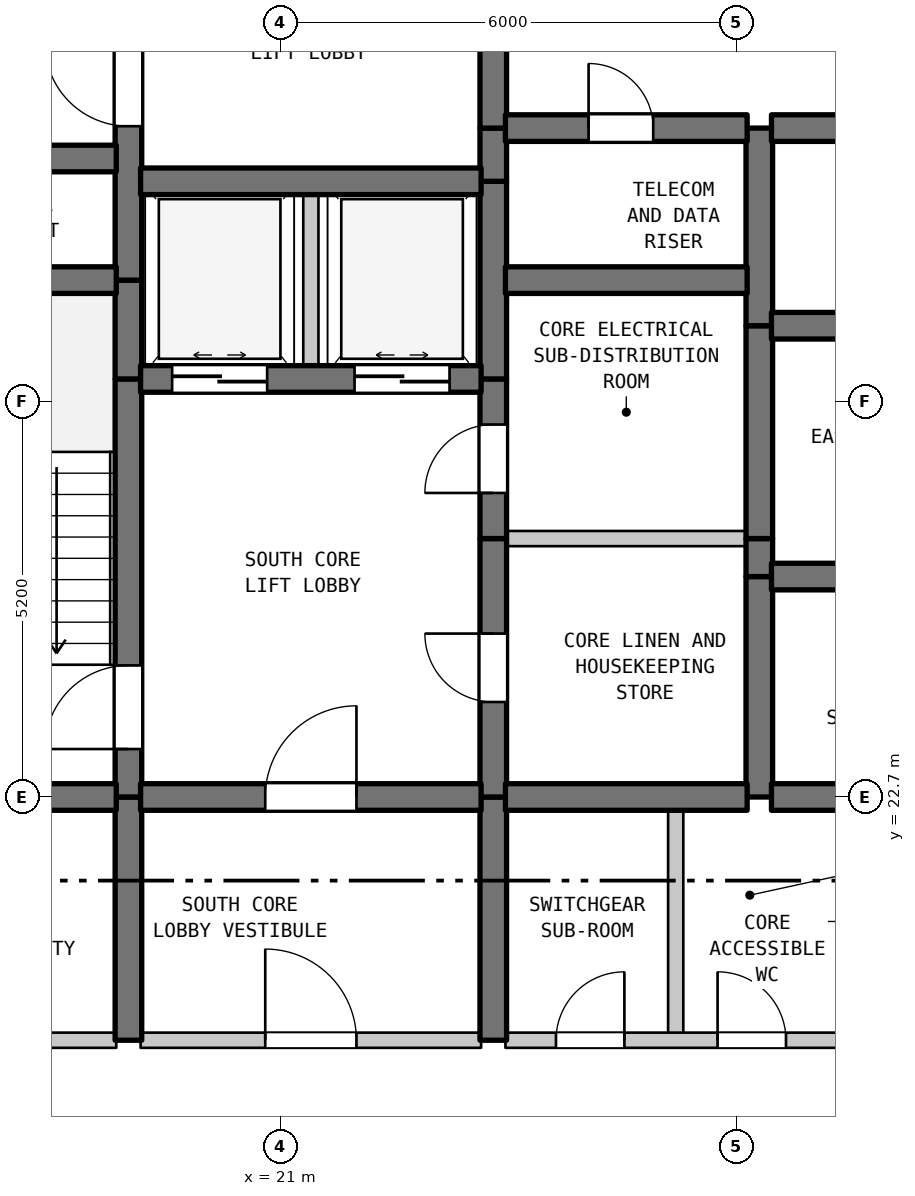
"""IFC4 building model, lengths in metres.
Left out: names, types, materials, properties, quantities, classifications, styles, units other than length and angle.
Written with IfcOpenShell. Run it as: python <this file> out.ifc"""

import sys

from ifc_helpers import new_model, si_unit, direction, frame, frame_2d, origin, place, context, subcontext, project, spatial, rectangle, extrude, element, fill, save


model = new_model("IFC4")
c1 = context("Model", 3, precision=1e-05, world=origin(), true_north=direction((0.0, 1.0)))
c2 = subcontext(c1, "Body", "Model", "MODEL_VIEW")
j1 = project(units=[si_unit("LENGTHUNIT", "METRE"), si_unit("PLANEANGLEUNIT", "RADIAN")], contexts=[c1])
p1 = place(None, origin())
s1 = spatial("IfcSite", under=j1, at=p1, CompositionType="ELEMENT")
p2 = place(p1, origin())
s2 = spatial("IfcBuilding", under=s1, at=p2, CompositionType="ELEMENT")
p3 = place(p2, frame((0.0, 0.0, 307.3)))
s3 = spatial("IfcBuildingStorey", under=s2, at=p3, CompositionType="ELEMENT", Elevation=307.3)
p4 = place(p3, frame((19.0, 19.5, 0.0), z_axis=(0.0, 0.0, 1.0), x_axis=(0.0, 1.0, 0.0)))
e1 = element("IfcWall", 1, at=p4, inside=s3, PredefinedType="SHEAR", context=c2, shape_type="SweptSolid", body=[
    extrude(rectangle(XDim=3.2, YDim=0.35, at=frame_2d((1.6, 0.0))), origin(), (0.0, 0.0, 1.0), 3.39),
])
p5 = place(p3, frame((19.0, 22.7, 0.0), z_axis=(0.0, 0.0, 1.0), x_axis=(0.0, 1.0, 0.0)))
e2 = element("IfcWall", 2, at=p5, inside=s3, PredefinedType="SHEAR", context=c2, shape_type="SweptSolid", body=[
    extrude(rectangle(XDim=5.5, YDim=0.35, at=frame_2d((2.75, 0.0))), origin(), (0.0, 0.0, 1.0), 3.39),
])
p6 = place(p5, frame((0.631, 0.0, 0.0)))
e3 = element("IfcOpeningElement", 3, at=p6, cuts=e2, PredefinedType="OPENING", context=c2, shape_type="SweptSolid", body=[
    extrude(rectangle(XDim=1.1, YDim=2.15, at=frame_2d((0.55, 1.075))), frame((0.0, 0.185, 0.0), z_axis=(0.0, -1.0, 0.0), x_axis=(1.0, 0.0, 0.0)), (0.0, 0.0, 1.0), 0.37),
])
p7 = place(p3, frame((19.0, 28.2, 0.0), z_axis=(0.0, 0.0, 1.0), x_axis=(0.0, 1.0, 0.0)))
e4 = element("IfcWall", 4, at=p7, inside=s3, PredefinedType="SHEAR", context=c2, shape_type="SweptSolid", body=[
    extrude(rectangle(XDim=1.3, YDim=0.35, at=frame_2d((0.65, 0.0))), origin(), (0.0, 0.0, 1.0), 3.39),
])
p8 = place(p3, frame((19.0, 29.5, 0.0), z_axis=(0.0, 0.0, 1.0), x_axis=(0.0, 1.0, 0.0)))
e5 = element("IfcWall", 5, at=p8, inside=s3, PredefinedType="SHEAR", context=c2, shape_type="SweptSolid", body=[
    extrude(rectangle(XDim=5.5, YDim=0.35, at=frame_2d((2.75, 0.0))), origin(), (0.0, 0.0, 1.0), 3.39),
])
p9 = place(p8, frame((2.025, 0.0, 0.0)))
e6 = element("IfcOpeningElement", 6, at=p9, cuts=e5, PredefinedType="OPENING", context=c2, shape_type="SweptSolid", body=[
    extrude(rectangle(XDim=1.1, YDim=2.15, at=frame_2d((0.55, 1.075))), frame((0.0, 0.185, 0.0), z_axis=(0.0, -1.0, 0.0), x_axis=(1.0, 0.0, 0.0)), (0.0, 0.0, 1.0), 0.37),
])
p10 = place(p3, frame((21.4, 28.2, 0.0), z_axis=(0.0, 0.0, 1.0), x_axis=(0.0, 1.0, 0.0)))
e7 = element("IfcWall", 7, at=p10, inside=s3, PredefinedType="STANDARD", context=c2, shape_type="SweptSolid", body=[
    extrude(rectangle(XDim=2.6, YDim=0.2, at=frame_2d((1.3, 0.0))), origin(), (0.0, 0.0, 1.0), 3.39),
])
p11 = place(p3, frame((23.8, 19.5, 0.0), z_axis=(0.0, 0.0, 1.0), x_axis=(0.0, 1.0, 0.0)))
e8 = element("IfcWall", 8, at=p11, inside=s3, PredefinedType="SHEAR", context=c2, shape_type="SweptSolid", body=[
    extrude(rectangle(XDim=3.2, YDim=0.35, at=frame_2d((1.6, 0.0))), origin(), (0.0, 0.0, 1.0), 3.39),
])
p12 = place(p3, frame((23.8, 22.7, 0.0), z_axis=(0.0, 0.0, 1.0), x_axis=(0.0, 1.0, 0.0)))
e9 = element("IfcWall", 9, at=p12, inside=s3, PredefinedType="SHEAR", context=c2, shape_type="SweptSolid", body=[
    extrude(rectangle(XDim=3.4, YDim=0.35, at=frame_2d((1.7, 0.0))), origin(), (0.0, 0.0, 1.0), 3.39),
])
p13 = place(p12, frame((1.25, 0.0, 0.0)))
e10 = element("IfcOpeningElement", 10, at=p13, cuts=e9, PredefinedType="OPENING", context=c2, shape_type="SweptSolid", body=[
    extrude(rectangle(XDim=0.9, YDim=2.15, at=frame_2d((0.45, 1.075))), frame((0.0, 0.185, 0.0), z_axis=(0.0, -1.0, 0.0), x_axis=(1.0, 0.0, 0.0)), (0.0, 0.0, 1.0), 0.37),
])
p14 = place(p3, frame((23.8, 26.1, 0.0), z_axis=(0.0, 0.0, 1.0), x_axis=(0.0, 1.0, 0.0)))
e11 = element("IfcWall", 11, at=p14, inside=s3, PredefinedType="SHEAR", context=c2, shape_type="SweptSolid", body=[
    extrude(rectangle(XDim=2.1, YDim=0.35, at=frame_2d((1.05, 0.0))), origin(), (0.0, 0.0, 1.0), 3.39),
])
p15 = place(p14, frame((0.6, 0.0, 0.0)))
e12 = element("IfcOpeningElement", 12, at=p15, cuts=e11, PredefinedType="OPENING", context=c2, shape_type="SweptSolid", body=[
    extrude(rectangle(XDim=0.9, YDim=2.15, at=frame_2d((0.45, 1.075))), frame((0.0, 0.185, 0.0), z_axis=(0.0, -1.0, 0.0), x_axis=(1.0, 0.0, 0.0)), (0.0, 0.0, 1.0), 0.37),
])
p16 = place(p3, frame((23.8, 28.2, 0.0), z_axis=(0.0, 0.0, 1.0), x_axis=(0.0, 1.0, 0.0)))
e13 = element("IfcWall", 13, at=p16, inside=s3, PredefinedType="SHEAR", context=c2, shape_type="SweptSolid", body=[
    extrude(rectangle(XDim=2.6, YDim=0.35, at=frame_2d((1.3, 0.0))), origin(), (0.0, 0.0, 1.0), 3.39),
])
p17 = place(p3, frame((23.8, 30.8, 0.0), z_axis=(0.0, 0.0, 1.0), x_axis=(0.0, 1.0, 0.0)))
e14 = element("IfcWall", 14, at=p17, inside=s3, PredefinedType="SHEAR", context=c2, shape_type="SweptSolid", body=[
    extrude(rectangle(XDim=0.7, YDim=0.35, at=frame_2d((0.35, 0.0))), origin(), (0.0, 0.0, 1.0), 3.39),
])
p18 = place(p3, frame((23.8, 31.5, 0.0), z_axis=(0.0, 0.0, 1.0), x_axis=(0.0, 1.0, 0.0)))
e15 = element("IfcWall", 15, at=p18, inside=s3, PredefinedType="SHEAR", context=c2, shape_type="SweptSolid", body=[
    extrude(rectangle(XDim=3.5, YDim=0.35, at=frame_2d((1.75, 0.0))), origin(), (0.0, 0.0, 1.0), 3.39),
])
p19 = place(p18, frame((1.127, 0.0, 0.0)))
e16 = element("IfcOpeningElement", 16, at=p19, cuts=e15, PredefinedType="OPENING", context=c2, shape_type="SweptSolid", body=[
    extrude(rectangle(XDim=1.1, YDim=2.15, at=frame_2d((0.55, 1.075))), frame((0.0, 0.185, 0.0), z_axis=(0.0, -1.0, 0.0), x_axis=(1.0, 0.0, 0.0)), (0.0, 0.0, 1.0), 0.37),
])
p20 = place(p3, frame((26.2, 19.5, 0.0), z_axis=(0.0, 0.0, 1.0), x_axis=(0.0, 1.0, 0.0)))
e17 = element("IfcWall", 17, at=p20, inside=s3, PredefinedType="STANDARD", context=c2, shape_type="SweptSolid", body=[
    extrude(rectangle(XDim=3.2, YDim=0.2, at=frame_2d((1.6, 0.0))), origin(), (0.0, 0.0, 1.0), 3.39),
])
p21 = place(p3, frame((27.3, 22.7, 0.0), z_axis=(0.0, 0.0, 1.0), x_axis=(0.0, 1.0, 0.0)))
e18 = element("IfcWall", 18, at=p21, inside=s3, PredefinedType="SHEAR", context=c2, shape_type="SweptSolid", body=[
    extrude(rectangle(XDim=2.9, YDim=0.35, at=frame_2d((1.45, 0.0))), origin(), (0.0, 0.0, 1.0), 3.39),
])
p22 = place(p3, frame((27.3, 25.6, 0.0), z_axis=(0.0, 0.0, 1.0), x_axis=(0.0, 1.0, 0.0)))
e19 = element("IfcWall", 19, at=p22, inside=s3, PredefinedType="SHEAR", context=c2, shape_type="SweptSolid", body=[
    extrude(rectangle(XDim=0.5, YDim=0.35, at=frame_2d((0.25, 0.0))), origin(), (0.0, 0.0, 1.0), 3.39),
])
p23 = place(p3, frame((27.3, 26.1, 0.0), z_axis=(0.0, 0.0, 1.0), x_axis=(0.0, 1.0, 0.0)))
e20 = element("IfcWall", 20, at=p23, inside=s3, PredefinedType="SHEAR", context=c2, shape_type="SweptSolid", body=[
    extrude(rectangle(XDim=2.8, YDim=0.35, at=frame_2d((1.4, 0.0))), origin(), (0.0, 0.0, 1.0), 3.39),
])
p24 = place(p3, frame((27.3, 28.9, 0.0), z_axis=(0.0, 0.0, 1.0), x_axis=(0.0, 1.0, 0.0)))
e21 = element("IfcWall", 21, at=p24, inside=s3, PredefinedType="SHEAR", context=c2, shape_type="SweptSolid", body=[
    extrude(rectangle(XDim=2.6, YDim=0.35, at=frame_2d((1.3, 0.0))), origin(), (0.0, 0.0, 1.0), 3.39),
])
p25 = place(p3, frame((15.16, 19.5, 0.0), z_axis=(0.0, 0.0, 1.0), x_axis=(1.0, 0.0, 0.0)))
e22 = element("IfcWall", 22, at=p25, inside=s3, PredefinedType="STANDARD", context=c2, shape_type="SweptSolid", body=[
    extrude(rectangle(XDim=3.68, YDim=0.2, at=frame_2d((1.84, 0.0))), origin(), (0.0, 0.0, 1.0), 3.39),
])
p26 = place(p25, frame((1.39, 0.0, 0.0)))
e23 = element("IfcOpeningElement", 23, at=p26, cuts=e22, PredefinedType="OPENING", context=c2, shape_type="SweptSolid", body=[
    extrude(rectangle(XDim=0.9, YDim=2.15, at=frame_2d((0.45, 1.075))), frame((0.0, 0.11, 0.0), z_axis=(0.0, -1.0, 0.0), x_axis=(1.0, 0.0, 0.0)), (0.0, 0.0, 1.0), 0.22),
])
p27 = place(p3, frame((19.16, 19.5, 0.0), z_axis=(0.0, 0.0, 1.0), x_axis=(1.0, 0.0, 0.0)))
e24 = element("IfcWall", 24, at=p27, inside=s3, PredefinedType="STANDARD", context=c2, shape_type="SweptSolid", body=[
    extrude(rectangle(XDim=4.48, YDim=0.2, at=frame_2d((2.24, 0.0))), origin(), (0.0, 0.0, 1.0), 3.39),
])
p28 = place(p27, frame((1.64, 0.0, 0.0)))
e25 = element("IfcOpeningElement", 25, at=p28, cuts=e24, PredefinedType="OPENING", context=c2, shape_type="SweptSolid", body=[
    extrude(rectangle(XDim=1.2, YDim=2.2, at=frame_2d((0.6, 1.1))), frame((0.0, 0.11, 0.0), z_axis=(0.0, -1.0, 0.0), x_axis=(1.0, 0.0, 0.0)), (0.0, 0.0, 1.0), 0.22),
])
p29 = place(p3, frame((23.96, 19.5, 0.0), z_axis=(0.0, 0.0, 1.0), x_axis=(1.0, 0.0, 0.0)))
e26 = element("IfcWall", 26, at=p29, inside=s3, PredefinedType="STANDARD", context=c2, shape_type="SweptSolid", body=[
    extrude(rectangle(XDim=4.455, YDim=0.2, at=frame_2d((2.228, 0.0))), origin(), (0.0, 0.0, 1.0), 3.39),
])
p30 = place(p29, frame((0.665, 0.0, 0.0)))
e27 = element("IfcOpeningElement", 27, at=p30, cuts=e26, PredefinedType="OPENING", context=c2, shape_type="SweptSolid", body=[
    extrude(rectangle(XDim=0.9, YDim=2.15, at=frame_2d((0.45, 1.075))), frame((0.0, 0.11, 0.0), z_axis=(0.0, -1.0, 0.0), x_axis=(1.0, 0.0, 0.0)), (0.0, 0.0, 1.0), 0.22),
])
p31 = place(p29, frame((2.791, 0.0, 0.0)))
e28 = element("IfcOpeningElement", 28, at=p31, cuts=e26, PredefinedType="OPENING", context=c2, shape_type="SweptSolid", body=[
    extrude(rectangle(XDim=0.9, YDim=2.15, at=frame_2d((0.45, 1.075))), frame((0.0, 0.11, 0.0), z_axis=(0.0, -1.0, 0.0), x_axis=(1.0, 0.0, 0.0)), (0.0, 0.0, 1.0), 0.22),
])
p32 = place(p3, frame((15.16, 22.7, 0.0), z_axis=(0.0, 0.0, 1.0), x_axis=(1.0, 0.0, 0.0)))
e29 = element("IfcWall", 29, at=p32, inside=s3, PredefinedType="SHEAR", context=c2, shape_type="SweptSolid", body=[
    extrude(rectangle(XDim=3.68, YDim=0.35, at=frame_2d((1.84, 0.0))), origin(), (0.0, 0.0, 1.0), 3.39),
])
p33 = place(p3, frame((19.16, 22.7, 0.0), z_axis=(0.0, 0.0, 1.0), x_axis=(1.0, 0.0, 0.0)))
e30 = element("IfcWall", 30, at=p33, inside=s3, PredefinedType="SHEAR", context=c2, shape_type="SweptSolid", body=[
    extrude(rectangle(XDim=4.48, YDim=0.35, at=frame_2d((2.24, 0.0))), origin(), (0.0, 0.0, 1.0), 3.39),
])
p34 = place(p33, frame((1.64, 0.0, 0.0)))
e31 = element("IfcOpeningElement", 31, at=p34, cuts=e30, PredefinedType="OPENING", context=c2, shape_type="SweptSolid", body=[
    extrude(rectangle(XDim=1.2, YDim=2.2, at=frame_2d((0.6, 1.1))), frame((0.0, 0.185, 0.0), z_axis=(0.0, -1.0, 0.0), x_axis=(1.0, 0.0, 0.0)), (0.0, 0.0, 1.0), 0.37),
])
p35 = place(p3, frame((23.96, 22.7, 0.0), z_axis=(0.0, 0.0, 1.0), x_axis=(1.0, 0.0, 0.0)))
e32 = element("IfcWall", 32, at=p35, inside=s3, PredefinedType="SHEAR", context=c2, shape_type="SweptSolid", body=[
    extrude(rectangle(XDim=3.18, YDim=0.35, at=frame_2d((1.59, 0.0))), origin(), (0.0, 0.0, 1.0), 3.39),
])
p36 = place(p3, frame((27.46, 22.7, 0.0), z_axis=(0.0, 0.0, 1.0), x_axis=(1.0, 0.0, 0.0)))
e33 = element("IfcWall", 33, at=p36, inside=s3, PredefinedType="SHEAR", context=c2, shape_type="SweptSolid", body=[
    extrude(rectangle(XDim=0.955, YDim=0.35, at=frame_2d((0.478, 0.0))), origin(), (0.0, 0.0, 1.0), 3.39),
])
p37 = place(p3, frame((27.46, 25.6, 0.0), z_axis=(0.0, 0.0, 1.0), x_axis=(1.0, 0.0, 0.0)))
e34 = element("IfcWall", 34, at=p37, inside=s3, PredefinedType="SHEAR", context=c2, shape_type="SweptSolid", body=[
    extrude(rectangle(XDim=3.18, YDim=0.35, at=frame_2d((1.59, 0.0))), origin(), (0.0, 0.0, 1.0), 3.39),
])
p38 = place(p37, frame((1.115, 0.0, 0.0)))
e35 = element("IfcOpeningElement", 35, at=p38, cuts=e34, PredefinedType="OPENING", context=c2, shape_type="SweptSolid", body=[
    extrude(rectangle(XDim=0.95, YDim=2.15, at=frame_2d((0.475, 1.075))), frame((0.0, 0.185, 0.0), z_axis=(0.0, -1.0, 0.0), x_axis=(1.0, 0.0, 0.0)), (0.0, 0.0, 1.0), 0.37),
])
p39 = place(p3, frame((23.96, 26.1, 0.0), z_axis=(0.0, 0.0, 1.0), x_axis=(1.0, 0.0, 0.0)))
e36 = element("IfcWall", 36, at=p39, inside=s3, PredefinedType="STANDARD", context=c2, shape_type="SweptSolid", body=[
    extrude(rectangle(XDim=3.18, YDim=0.2, at=frame_2d((1.59, 0.0))), origin(), (0.0, 0.0, 1.0), 3.39),
])
p40 = place(p3, frame((19.16, 28.2, 0.0), z_axis=(0.0, 0.0, 1.0), x_axis=(1.0, 0.0, 0.0)))
e37 = element("IfcWall", 37, at=p40, inside=s3, PredefinedType="SHEAR", context=c2, shape_type="SweptSolid", body=[
    extrude(rectangle(XDim=4.48, YDim=0.35, at=frame_2d((2.24, 0.0))), origin(), (0.0, 0.0, 1.0), 3.39),
])
p41 = place(p40, frame((0.415, 0.0, 0.0)))
e38 = element("IfcOpeningElement", 38, at=p41, cuts=e37, PredefinedType="OPENING", context=c2, shape_type="SweptSolid", body=[
    extrude(rectangle(XDim=1.25, YDim=2.2, at=frame_2d((0.625, 1.1))), frame((0.0, 0.185, 0.0), z_axis=(0.0, -1.0, 0.0), x_axis=(1.0, 0.0, 0.0)), (0.0, 0.0, 1.0), 0.37),
])
p42 = place(p40, frame((2.815, 0.0, 0.0)))
e39 = element("IfcOpeningElement", 39, at=p42, cuts=e37, PredefinedType="OPENING", context=c2, shape_type="SweptSolid", body=[
    extrude(rectangle(XDim=1.25, YDim=2.2, at=frame_2d((0.625, 1.1))), frame((0.0, 0.185, 0.0), z_axis=(0.0, -1.0, 0.0), x_axis=(1.0, 0.0, 0.0)), (0.0, 0.0, 1.0), 0.37),
])
p43 = place(p3, frame((27.46, 28.9, 0.0), z_axis=(0.0, 0.0, 1.0), x_axis=(1.0, 0.0, 0.0)))
e40 = element("IfcWall", 40, at=p43, inside=s3, PredefinedType="SHEAR", context=c2, shape_type="SweptSolid", body=[
    extrude(rectangle(XDim=3.18, YDim=0.35, at=frame_2d((1.59, 0.0))), origin(), (0.0, 0.0, 1.0), 3.39),
])
p44 = place(p43, frame((1.115, 0.0, 0.0)))
e41 = element("IfcOpeningElement", 41, at=p44, cuts=e40, PredefinedType="OPENING", context=c2, shape_type="SweptSolid", body=[
    extrude(rectangle(XDim=0.95, YDim=2.15, at=frame_2d((0.475, 1.075))), frame((0.0, 0.185, 0.0), z_axis=(0.0, -1.0, 0.0), x_axis=(1.0, 0.0, 0.0)), (0.0, 0.0, 1.0), 0.37),
])
p45 = place(p3, frame((15.16, 29.5, 0.0), z_axis=(0.0, 0.0, 1.0), x_axis=(1.0, 0.0, 0.0)))
e42 = element("IfcWall", 42, at=p45, inside=s3, PredefinedType="SHEAR", context=c2, shape_type="SweptSolid", body=[
    extrude(rectangle(XDim=3.68, YDim=0.35, at=frame_2d((1.84, 0.0))), origin(), (0.0, 0.0, 1.0), 3.39),
])
p46 = place(p3, frame((23.96, 29.5, 0.0), z_axis=(0.0, 0.0, 1.0), x_axis=(1.0, 0.0, 0.0)))
e43 = element("IfcWall", 43, at=p46, inside=s3, PredefinedType="SHEAR", context=c2, shape_type="SweptSolid", body=[
    extrude(rectangle(XDim=3.18, YDim=0.35, at=frame_2d((1.59, 0.0))), origin(), (0.0, 0.0, 1.0), 3.39),
])
p47 = place(p3, frame((19.16, 30.8, 0.0), z_axis=(0.0, 0.0, 1.0), x_axis=(1.0, 0.0, 0.0)))
e44 = element("IfcWall", 44, at=p47, inside=s3, PredefinedType="SHEAR", context=c2, shape_type="SweptSolid", body=[
    extrude(rectangle(XDim=4.48, YDim=0.35, at=frame_2d((2.24, 0.0))), origin(), (0.0, 0.0, 1.0), 3.39),
])
p48 = place(p3, frame((15.16, 31.1, 0.0), z_axis=(0.0, 0.0, 1.0), x_axis=(1.0, 0.0, 0.0)))
e45 = element("IfcWall", 45, at=p48, inside=s3, PredefinedType="SHEAR", context=c2, shape_type="SweptSolid", body=[
    extrude(rectangle(XDim=3.68, YDim=0.35, at=frame_2d((1.84, 0.0))), origin(), (0.0, 0.0, 1.0), 3.39),
])
p49 = place(p3, frame((23.96, 31.5, 0.0), z_axis=(0.0, 0.0, 1.0), x_axis=(1.0, 0.0, 0.0)))
e46 = element("IfcWall", 46, at=p49, inside=s3, PredefinedType="SHEAR", context=c2, shape_type="SweptSolid", body=[
    extrude(rectangle(XDim=3.18, YDim=0.35, at=frame_2d((1.59, 0.0))), origin(), (0.0, 0.0, 1.0), 3.39),
])
p50 = place(p49, frame((1.094, 0.0, 0.0)))
e47 = element("IfcOpeningElement", 47, at=p50, cuts=e46, PredefinedType="OPENING", context=c2, shape_type="SweptSolid", body=[
    extrude(rectangle(XDim=0.85, YDim=2.1, at=frame_2d((0.425, 1.05))), frame((0.0, 0.185, 0.0), z_axis=(0.0, -1.0, 0.0), x_axis=(1.0, 0.0, 0.0)), (0.0, 0.0, 1.0), 0.37),
])
p51 = place(p3, frame((27.46, 31.5, 0.0), z_axis=(0.0, 0.0, 1.0), x_axis=(1.0, 0.0, 0.0)))
e48 = element("IfcWall", 48, at=p51, inside=s3, PredefinedType="SHEAR", context=c2, shape_type="SweptSolid", body=[
    extrude(rectangle(XDim=3.18, YDim=0.35, at=frame_2d((1.59, 0.0))), origin(), (0.0, 0.0, 1.0), 3.39),
])
p52 = place(p6, origin())
e49 = element("IfcDoor", 49, at=p52, inside=s3, OperationType="SINGLE_SWING_LEFT", PredefinedType="DOOR", context=c2, shape_type="SweptSolid", body=[
    extrude(rectangle(XDim=1.1, YDim=2.15, at=frame_2d((0.55, 1.075))), frame((0.0, 0.025, 0.0), z_axis=(0.0, -1.0, 0.0), x_axis=(1.0, 0.0, 0.0)), (0.0, 0.0, 1.0), 0.05),
])
fill(e3, e49)
p53 = place(p9, origin())
e50 = element("IfcDoor", 50, at=p53, inside=s3, OperationType="SINGLE_SWING_RIGHT", PredefinedType="DOOR", context=c2, shape_type="SweptSolid", body=[
    extrude(rectangle(XDim=1.1, YDim=2.15, at=frame_2d((0.55, 1.075))), frame((0.0, 0.025, 0.0), z_axis=(0.0, -1.0, 0.0), x_axis=(1.0, 0.0, 0.0)), (0.0, 0.0, 1.0), 0.05),
])
fill(e6, e50)
p54 = place(p13, origin())
e51 = element("IfcDoor", 51, at=p54, inside=s3, OperationType="SINGLE_SWING_RIGHT", PredefinedType="DOOR", context=c2, shape_type="SweptSolid", body=[
    extrude(rectangle(XDim=0.9, YDim=2.15, at=frame_2d((0.45, 1.075))), frame((0.0, 0.025, 0.0), z_axis=(0.0, -1.0, 0.0), x_axis=(1.0, 0.0, 0.0)), (0.0, 0.0, 1.0), 0.05),
])
fill(e10, e51)
p55 = place(p15, origin())
e52 = element("IfcDoor", 52, at=p55, inside=s3, OperationType="SINGLE_SWING_LEFT", PredefinedType="DOOR", context=c2, shape_type="SweptSolid", body=[
    extrude(rectangle(XDim=0.9, YDim=2.15, at=frame_2d((0.45, 1.075))), frame((0.0, 0.025, 0.0), z_axis=(0.0, -1.0, 0.0), x_axis=(1.0, 0.0, 0.0)), (0.0, 0.0, 1.0), 0.05),
])
fill(e12, e52)
p56 = place(p28, origin())
e53 = element("IfcDoor", 53, at=p56, inside=s3, OperationType="SINGLE_SWING_LEFT", PredefinedType="DOOR", context=c2, shape_type="SweptSolid", body=[
    extrude(rectangle(XDim=1.2, YDim=2.2, at=frame_2d((0.6, 1.1))), frame((0.0, 0.025, 0.0), z_axis=(0.0, -1.0, 0.0), x_axis=(1.0, 0.0, 0.0)), (0.0, 0.0, 1.0), 0.05),
])
fill(e25, e53)
p57 = place(p30, origin())
e54 = element("IfcDoor", 54, at=p57, inside=s3, OperationType="SINGLE_SWING_RIGHT", PredefinedType="DOOR", context=c2, shape_type="SweptSolid", body=[
    extrude(rectangle(XDim=0.9, YDim=2.15, at=frame_2d((0.45, 1.075))), frame((0.0, 0.025, 0.0), z_axis=(0.0, -1.0, 0.0), x_axis=(1.0, 0.0, 0.0)), (0.0, 0.0, 1.0), 0.05),
])
fill(e27, e54)
p58 = place(p31, origin())
e55 = element("IfcDoor", 55, at=p58, inside=s3, OperationType="SINGLE_SWING_LEFT", PredefinedType="DOOR", context=c2, shape_type="SweptSolid", body=[
    extrude(rectangle(XDim=0.9, YDim=2.15, at=frame_2d((0.45, 1.075))), frame((0.0, 0.025, 0.0), z_axis=(0.0, -1.0, 0.0), x_axis=(1.0, 0.0, 0.0)), (0.0, 0.0, 1.0), 0.05),
])
fill(e28, e55)
p59 = place(p34, origin())
e56 = element("IfcDoor", 56, at=p59, inside=s3, OperationType="SINGLE_SWING_RIGHT", PredefinedType="DOOR", context=c2, shape_type="SweptSolid", body=[
    extrude(rectangle(XDim=1.2, YDim=2.2, at=frame_2d((0.6, 1.1))), frame((0.0, 0.025, 0.0), z_axis=(0.0, -1.0, 0.0), x_axis=(1.0, 0.0, 0.0)), (0.0, 0.0, 1.0), 0.05),
])
fill(e31, e56)
p60 = place(p41, origin())
e57 = element("IfcDoor", 57, at=p60, inside=s3, OperationType="DOUBLE_DOOR_SLIDING", PredefinedType="DOOR", context=c2, shape_type="SweptSolid", body=[
    extrude(rectangle(XDim=1.25, YDim=2.2, at=frame_2d((0.625, 1.1))), frame((0.0, 0.025, 0.0), z_axis=(0.0, -1.0, 0.0), x_axis=(1.0, 0.0, 0.0)), (0.0, 0.0, 1.0), 0.05),
])
fill(e38, e57)
p61 = place(p42, origin())
e58 = element("IfcDoor", 58, at=p61, inside=s3, OperationType="DOUBLE_DOOR_SLIDING", PredefinedType="DOOR", context=c2, shape_type="SweptSolid", body=[
    extrude(rectangle(XDim=1.25, YDim=2.2, at=frame_2d((0.625, 1.1))), frame((0.0, 0.025, 0.0), z_axis=(0.0, -1.0, 0.0), x_axis=(1.0, 0.0, 0.0)), (0.0, 0.0, 1.0), 0.05),
])
fill(e39, e58)
p62 = place(p50, origin())
e59 = element("IfcDoor", 59, at=p62, inside=s3, OperationType="SINGLE_SWING_LEFT", PredefinedType="DOOR", context=c2, shape_type="SweptSolid", body=[
    extrude(rectangle(XDim=0.85, YDim=2.1, at=frame_2d((0.425, 1.05))), frame((0.0, 0.025, 0.0), z_axis=(0.0, -1.0, 0.0), x_axis=(1.0, 0.0, 0.0)), (0.0, 0.0, 1.0), 0.05),
])
fill(e47, e59)
save(model, sys.argv[1])
